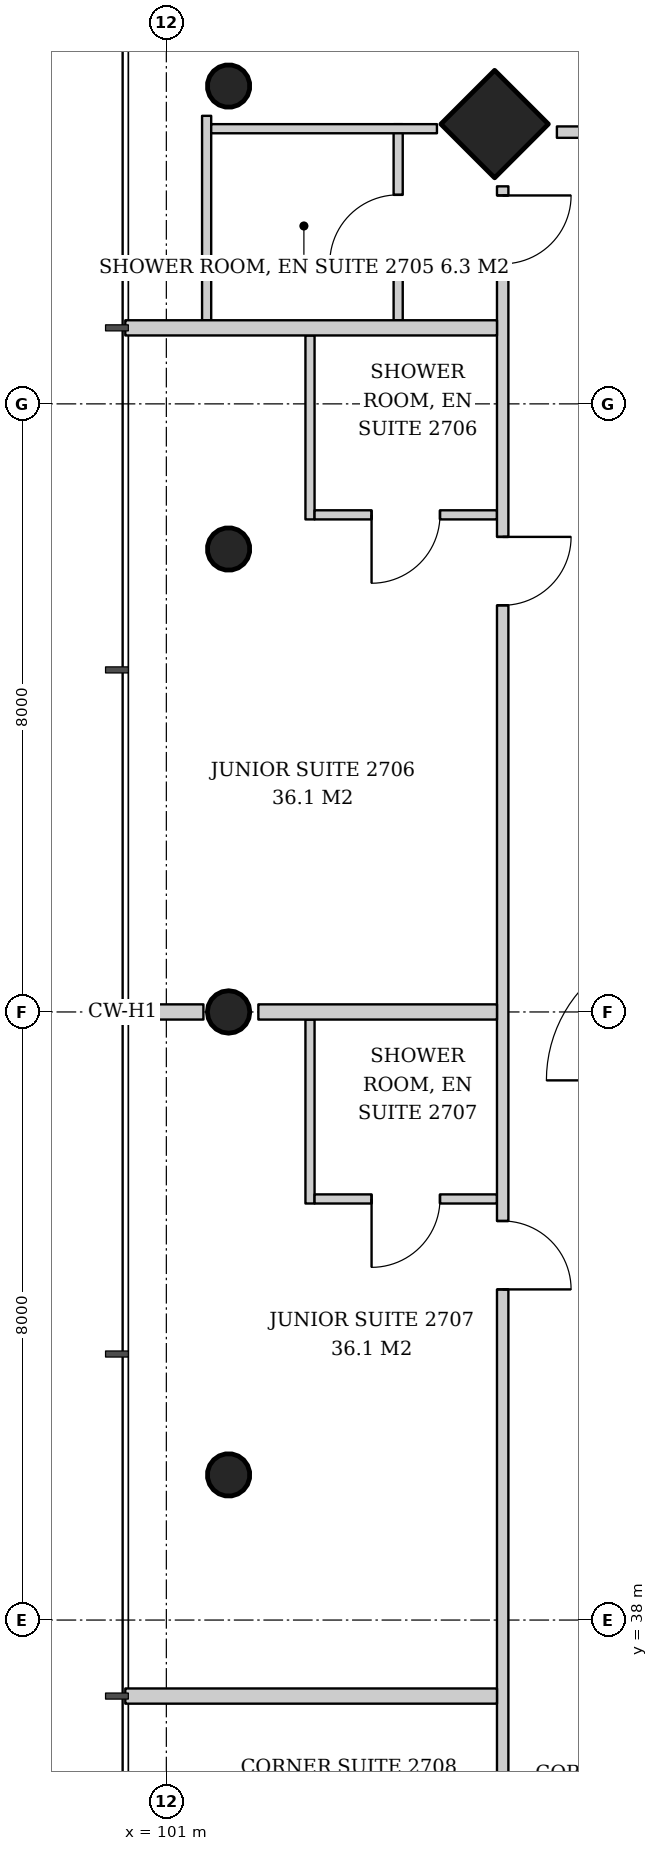
"""IFC4 building model, lengths in metres.
Left out: names, types, materials, properties, quantities, classifications, styles, units other than length and angle.
Written with IfcOpenShell. Run it as: python <this file> out.ifc"""

import sys

from ifc_helpers import new_model, si_unit, direction, frame, frame_2d, origin, origin_2d, place, context, subcontext, project, spatial, rectangle, hollow_circle, extrude, element, fill, save


model = new_model("IFC4")
c1 = context("Model", 3, precision=1e-05, world=origin(), true_north=direction((0.0, 1.0)))
c2 = subcontext(c1, "Body", "Model", "MODEL_VIEW")
j1 = project(units=[si_unit("LENGTHUNIT", "METRE"), si_unit("PLANEANGLEUNIT", "RADIAN")], contexts=[c1])
p1 = place(None, origin())
s1 = spatial("IfcSite", under=j1, at=p1, CompositionType="ELEMENT")
p2 = place(p1, origin())
s2 = spatial("IfcBuilding", under=s1, at=p2, CompositionType="ELEMENT")
p3 = place(p2, frame((0.0, 0.0, 108.4)))
s3 = spatial("IfcBuildingStorey", under=s2, at=p3, CompositionType="ELEMENT", Elevation=108.4)
p4 = place(p3, frame((105.267, 57.733, 0.0), z_axis=(0.043029647111, -0.043029647111, 0.998146732169), x_axis=(0.707106781187, 0.707106781187, 0.0)))
e1 = element("IfcColumn", 1, at=p4, inside=s3, PredefinedType="COLUMN", context=c2, shape_type="SweptSolid", body=[
    extrude(rectangle(XDim=1.0, YDim=1.0, at=origin_2d()), origin(), (0.0, 0.0, 1.0), 3.807),
])
p5 = place(p3, frame((101.767, 58.233, 0.0), z_axis=(0.043029647111, -0.043029647111, 0.998146732169), x_axis=(0.707106781187, 0.707106781187, 0.0)))
e2 = element("IfcColumn", 2, at=p5, inside=s3, PredefinedType="COLUMN", context=c2, shape_type="SweptSolid", body=[
    extrude(hollow_circle(Radius=0.28, WallThickness=0.02, at=origin_2d()), origin(), (0.0, 0.0, 1.0), 3.807),
])
p6 = place(p3, frame((101.767, 52.116, 0.0), z_axis=(0.043059525333, -0.021561848751, 0.998839808957), x_axis=(0.44774654769, 0.894160516368, 0.0)))
e3 = element("IfcColumn", 3, at=p6, inside=s3, PredefinedType="COLUMN", context=c2, shape_type="SweptSolid", body=[
    extrude(hollow_circle(Radius=0.28, WallThickness=0.02, at=origin_2d()), origin(), (0.0, 0.0, 1.0), 3.804),
])
p7 = place(p3, frame((101.767, 46.0, 0.0), z_axis=(0.043069538298, 0.0, 0.999072076915), x_axis=(0.0, 1.0, 0.0)))
e4 = element("IfcColumn", 4, at=p7, inside=s3, PredefinedType="COLUMN", context=c2, shape_type="SweptSolid", body=[
    extrude(hollow_circle(Radius=0.28, WallThickness=0.02, at=origin_2d()), origin(), (0.0, 0.0, 1.0), 3.803),
])
p8 = place(p3, frame((101.767, 39.884, 0.0), z_axis=(0.043059525333, 0.021561848751, 0.998839808957), x_axis=(-0.44774654769, 0.894160516368, 0.0)))
e5 = element("IfcColumn", 5, at=p8, inside=s3, PredefinedType="COLUMN", context=c2, shape_type="SweptSolid", body=[
    extrude(hollow_circle(Radius=0.28, WallThickness=0.02, at=origin_2d()), origin(), (0.0, 0.0, 1.0), 3.804),
])
p9 = place(p3, frame((127.862, 57.575, 0.0), z_axis=(0.0, 0.0, 1.0), x_axis=(-1.0, 0.0, 0.0)))
e6 = element("IfcWall", 6, at=p9, inside=s3, PredefinedType="PARTITIONING", context=c2, shape_type="SweptSolid", body=[
    extrude(rectangle(XDim=21.724, YDim=0.15, at=frame_2d((10.862, 0.0))), origin(), (0.0, 0.0, 1.0), 2.9),
])
p10 = place(p9, frame((0.12, 0.0, 0.0)))
e7 = element("IfcOpeningElement", 7, at=p10, cuts=e6, PredefinedType="OPENING", context=c2, shape_type="SweptSolid", body=[
    extrude(rectangle(XDim=0.9, YDim=2.1, at=frame_2d((0.45, 1.05))), frame((0.0, 0.085, 0.0), z_axis=(0.0, -1.0, 0.0), x_axis=(1.0, 0.0, 0.0)), (0.0, 0.0, 1.0), 0.17),
])
p11 = place(p9, frame((4.562, 0.0, 0.0)))
e8 = element("IfcOpeningElement", 8, at=p11, cuts=e6, PredefinedType="OPENING", context=c2, shape_type="SweptSolid", body=[
    extrude(rectangle(XDim=1.0, YDim=2.1, at=frame_2d((0.5, 1.05))), frame((0.0, 0.085, 0.0), z_axis=(0.0, -1.0, 0.0), x_axis=(1.0, 0.0, 0.0)), (0.0, 0.0, 1.0), 0.17),
])
p12 = place(p9, frame((13.612, 0.0, 0.0)))
e9 = element("IfcOpeningElement", 9, at=p12, cuts=e6, PredefinedType="OPENING", context=c2, shape_type="SweptSolid", body=[
    extrude(rectangle(XDim=0.9, YDim=2.1, at=frame_2d((0.45, 1.05))), frame((0.0, 0.085, 0.0), z_axis=(0.0, -1.0, 0.0), x_axis=(1.0, 0.0, 0.0)), (0.0, 0.0, 1.0), 0.17),
])
p13 = place(p3, frame((104.05, 55.1, 0.0), z_axis=(0.0, 0.0, 1.0), x_axis=(0.0, 1.0, 0.0)))
e10 = element("IfcWall", 10, at=p13, inside=s3, PredefinedType="PARTITIONING", context=c2, shape_type="SweptSolid", body=[
    extrude(rectangle(XDim=2.58, YDim=0.12, at=frame_2d((1.29, 0.0))), origin(), (0.0, 0.0, 1.0), 2.9),
])
p14 = place(p13, frame((0.75, 0.0, 0.0)))
e11 = element("IfcOpeningElement", 11, at=p14, cuts=e10, PredefinedType="OPENING", context=c2, shape_type="SweptSolid", body=[
    extrude(rectangle(XDim=0.9, YDim=2.1, at=frame_2d((0.45, 1.05))), frame((0.0, 0.07, 0.0), z_axis=(0.0, -1.0, 0.0), x_axis=(1.0, 0.0, 0.0)), (0.0, 0.0, 1.0), 0.14),
])
p15 = place(p3, frame((101.53, 55.1, 0.0), z_axis=(0.0, 0.0, 1.0), x_axis=(0.0, 1.0, 0.0)))
e12 = element("IfcWall", 12, at=p15, inside=s3, PredefinedType="PARTITIONING", context=c2, shape_type="SweptSolid", body=[
    extrude(rectangle(XDim=2.689, YDim=0.12, at=frame_2d((1.345, 0.0))), origin(), (0.0, 0.0, 1.0), 3.6),
])
p16 = place(p3, frame((104.56, 57.62, 0.0), z_axis=(0.0, 0.0, 1.0), x_axis=(-1.0, 0.0, 0.0)))
e13 = element("IfcWall", 13, at=p16, inside=s3, PredefinedType="PARTITIONING", context=c2, shape_type="SweptSolid", body=[
    extrude(rectangle(XDim=2.97, YDim=0.12, at=frame_2d((1.485, 0.0))), origin(), (0.0, 0.0, 1.0), 3.2),
])
p17 = place(p3, frame((102.89, 54.9, 0.0), z_axis=(0.0, 0.0, 1.0), x_axis=(0.0, -1.0, 0.0)))
e14 = element("IfcWall", 14, at=p17, inside=s3, PredefinedType="PARTITIONING", context=c2, shape_type="SweptSolid", body=[
    extrude(rectangle(XDim=2.42, YDim=0.12, at=frame_2d((1.21, 0.0))), origin(), (0.0, 0.0, 1.0), 3.6),
])
p18 = place(p3, frame((105.35, 52.54, 0.0), z_axis=(0.0, 0.0, 1.0), x_axis=(-1.0, 0.0, 0.0)))
e15 = element("IfcWall", 15, at=p18, inside=s3, PredefinedType="PARTITIONING", context=c2, shape_type="SweptSolid", body=[
    extrude(rectangle(XDim=2.4, YDim=0.12, at=frame_2d((1.2, 0.0))), origin(), (0.0, 0.0, 1.0), 3.6),
])
p19 = place(p18, frame((0.75, 0.0, 0.0)))
e16 = element("IfcOpeningElement", 16, at=p19, cuts=e15, PredefinedType="OPENING", context=c2, shape_type="SweptSolid", body=[
    extrude(rectangle(XDim=0.9, YDim=2.1, at=frame_2d((0.45, 1.05))), frame((0.0, 0.07, 0.0), z_axis=(0.0, -1.0, 0.0), x_axis=(1.0, 0.0, 0.0)), (0.0, 0.0, 1.0), 0.14),
])
p20 = place(p3, frame((102.89, 45.9, 0.0), z_axis=(0.0, 0.0, 1.0), x_axis=(0.0, -1.0, 0.0)))
e17 = element("IfcWall", 17, at=p20, inside=s3, PredefinedType="PARTITIONING", context=c2, shape_type="SweptSolid", body=[
    extrude(rectangle(XDim=2.42, YDim=0.12, at=frame_2d((1.21, 0.0))), origin(), (0.0, 0.0, 1.0), 3.6),
])
p21 = place(p3, frame((105.35, 43.54, 0.0), z_axis=(0.0, 0.0, 1.0), x_axis=(-1.0, 0.0, 0.0)))
e18 = element("IfcWall", 18, at=p21, inside=s3, PredefinedType="PARTITIONING", context=c2, shape_type="SweptSolid", body=[
    extrude(rectangle(XDim=2.4, YDim=0.12, at=frame_2d((1.2, 0.0))), origin(), (0.0, 0.0, 1.0), 3.6),
])
p22 = place(p21, frame((0.75, 0.0, 0.0)))
e19 = element("IfcOpeningElement", 19, at=p22, cuts=e18, PredefinedType="OPENING", context=c2, shape_type="SweptSolid", body=[
    extrude(rectangle(XDim=0.9, YDim=2.1, at=frame_2d((0.45, 1.05))), frame((0.0, 0.07, 0.0), z_axis=(0.0, -1.0, 0.0), x_axis=(1.0, 0.0, 0.0)), (0.0, 0.0, 1.0), 0.14),
])
p23 = place(p3, frame((105.425, 56.862, 0.0), z_axis=(0.0, 0.0, 1.0), x_axis=(0.0, -1.0, 0.0)))
e20 = element("IfcWall", 20, at=p23, inside=s3, PredefinedType="PARTITIONING", context=c2, shape_type="SweptSolid", body=[
    extrude(rectangle(XDim=21.724, YDim=0.15, at=frame_2d((10.862, 0.0))), origin(), (0.0, 0.0, 1.0), 2.9),
])
p24 = place(p23, frame((0.12, 0.0, 0.0)))
e21 = element("IfcOpeningElement", 21, at=p24, cuts=e20, PredefinedType="OPENING", context=c2, shape_type="SweptSolid", body=[
    extrude(rectangle(XDim=0.9, YDim=2.1, at=frame_2d((0.45, 1.05))), frame((0.0, 0.085, 0.0), z_axis=(0.0, -1.0, 0.0), x_axis=(1.0, 0.0, 0.0)), (0.0, 0.0, 1.0), 0.17),
])
p25 = place(p23, frame((4.612, 0.0, 0.0)))
e22 = element("IfcOpeningElement", 22, at=p25, cuts=e20, PredefinedType="OPENING", context=c2, shape_type="SweptSolid", body=[
    extrude(rectangle(XDim=0.9, YDim=2.1, at=frame_2d((0.45, 1.05))), frame((0.0, 0.085, 0.0), z_axis=(0.0, -1.0, 0.0), x_axis=(1.0, 0.0, 0.0)), (0.0, 0.0, 1.0), 0.17),
])
p26 = place(p23, frame((13.612, 0.0, 0.0)))
e23 = element("IfcOpeningElement", 23, at=p26, cuts=e20, PredefinedType="OPENING", context=c2, shape_type="SweptSolid", body=[
    extrude(rectangle(XDim=0.9, YDim=2.1, at=frame_2d((0.45, 1.05))), frame((0.0, 0.085, 0.0), z_axis=(0.0, -1.0, 0.0), x_axis=(1.0, 0.0, 0.0)), (0.0, 0.0, 1.0), 0.17),
])
p27 = place(p3, frame((105.35, 55.0, 0.0), z_axis=(0.0, 0.0, 1.0), x_axis=(-1.0, 0.0, 0.0)))
e24 = element("IfcWall", 24, at=p27, inside=s3, PredefinedType="PARTITIONING", context=c2, shape_type="SweptSolid", body=[
    extrude(rectangle(XDim=4.89, YDim=0.2, at=frame_2d((2.445, 0.0))), origin(), (0.0, 0.0, 1.0), 2.9),
])
p28 = place(p3, frame((105.35, 46.0, 0.0), z_axis=(0.0, 0.0, 1.0), x_axis=(-1.0, 0.0, 0.0)))
e25 = element("IfcWall", 25, at=p28, inside=s3, PredefinedType="PARTITIONING", context=c2, shape_type="SweptSolid", body=[
    extrude(rectangle(XDim=3.14, YDim=0.2, at=frame_2d((1.57, 0.0))), origin(), (0.0, 0.0, 1.0), 3.6),
])
p29 = place(p3, frame((101.488, 46.0, 0.0), z_axis=(0.0, 0.0, 1.0), x_axis=(-1.0, 0.0, 0.0)))
e26 = element("IfcWall", 26, at=p29, inside=s3, PredefinedType="PARTITIONING", context=c2, shape_type="SweptSolid", body=[
    extrude(rectangle(XDim=1.028, YDim=0.2, at=frame_2d((0.514, 0.0))), origin(), (0.0, 0.0, 1.0), 3.6),
])
p30 = place(p3, frame((105.35, 37.0, 0.0), z_axis=(0.0, 0.0, 1.0), x_axis=(-1.0, 0.0, 0.0)))
e27 = element("IfcWall", 27, at=p30, inside=s3, PredefinedType="PARTITIONING", context=c2, shape_type="SweptSolid", body=[
    extrude(rectangle(XDim=4.89, YDim=0.2, at=frame_2d((2.445, 0.0))), origin(), (0.0, 0.0, 1.0), 3.2),
])
p31 = place(p14, origin())
e28 = element("IfcDoor", 28, at=p31, inside=s3, OperationType="SINGLE_SWING_LEFT", PredefinedType="DOOR", context=c2, shape_type="SweptSolid", body=[
    extrude(rectangle(XDim=0.9, YDim=2.1, at=frame_2d((0.45, 1.05))), frame((0.0, 0.025, 0.0), z_axis=(0.0, -1.0, 0.0), x_axis=(1.0, 0.0, 0.0)), (0.0, 0.0, 1.0), 0.05),
])
fill(e11, e28)
p32 = place(p19, origin())
e29 = element("IfcDoor", 29, at=p32, inside=s3, OperationType="SINGLE_SWING_RIGHT", PredefinedType="DOOR", context=c2, shape_type="SweptSolid", body=[
    extrude(rectangle(XDim=0.9, YDim=2.1, at=frame_2d((0.45, 1.05))), frame((0.0, 0.025, 0.0), z_axis=(0.0, -1.0, 0.0), x_axis=(1.0, 0.0, 0.0)), (0.0, 0.0, 1.0), 0.05),
])
fill(e16, e29)
p33 = place(p22, origin())
e30 = element("IfcDoor", 30, at=p33, inside=s3, OperationType="SINGLE_SWING_RIGHT", PredefinedType="DOOR", context=c2, shape_type="SweptSolid", body=[
    extrude(rectangle(XDim=0.9, YDim=2.1, at=frame_2d((0.45, 1.05))), frame((0.0, 0.025, 0.0), z_axis=(0.0, -1.0, 0.0), x_axis=(1.0, 0.0, 0.0)), (0.0, 0.0, 1.0), 0.05),
])
fill(e19, e30)
p34 = place(p24, origin())
e31 = element("IfcDoor", 31, at=p34, inside=s3, OperationType="SINGLE_SWING_LEFT", PredefinedType="DOOR", context=c2, shape_type="SweptSolid", body=[
    extrude(rectangle(XDim=0.9, YDim=2.1, at=frame_2d((0.45, 1.05))), frame((0.0, 0.025, 0.0), z_axis=(0.0, -1.0, 0.0), x_axis=(1.0, 0.0, 0.0)), (0.0, 0.0, 1.0), 0.05),
])
fill(e21, e31)
p35 = place(p25, origin())
e32 = element("IfcDoor", 32, at=p35, inside=s3, OperationType="SINGLE_SWING_LEFT", PredefinedType="DOOR", context=c2, shape_type="SweptSolid", body=[
    extrude(rectangle(XDim=0.9, YDim=2.1, at=frame_2d((0.45, 1.05))), frame((0.0, 0.025, 0.0), z_axis=(0.0, -1.0, 0.0), x_axis=(1.0, 0.0, 0.0)), (0.0, 0.0, 1.0), 0.05),
])
fill(e22, e32)
p36 = place(p26, origin())
e33 = element("IfcDoor", 33, at=p36, inside=s3, OperationType="SINGLE_SWING_RIGHT", PredefinedType="DOOR", context=c2, shape_type="SweptSolid", body=[
    extrude(rectangle(XDim=0.9, YDim=2.1, at=frame_2d((0.45, 1.05))), frame((0.0, 0.025, 0.0), z_axis=(0.0, -1.0, 0.0), x_axis=(1.0, 0.0, 0.0)), (0.0, 0.0, 1.0), 0.05),
])
fill(e23, e33)
save(model, sys.argv[1])
